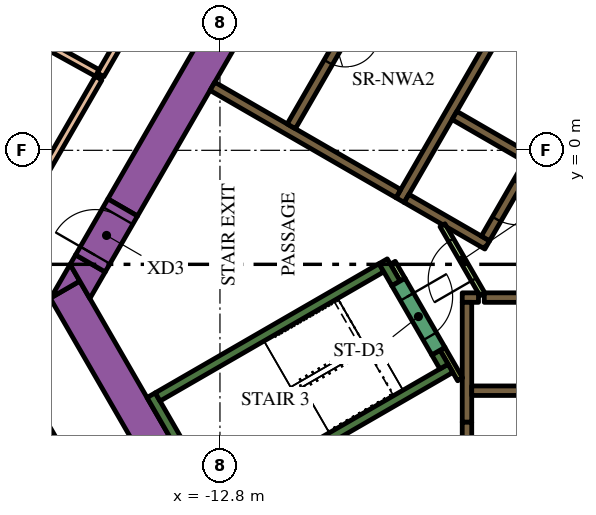
"""IFC4 building model, lengths in metres.
Left out: names, types, materials, properties, quantities, classifications, styles, units other than length and angle.
Written with IfcOpenShell. Run it as: python <this file> out.ifc"""

import sys

from ifc_helpers import new_model, si_unit, direction, frame, frame_2d, origin, place, context, subcontext, project, spatial, polyline, rectangle, outline, extrude, element, fill, save


model = new_model("IFC4")
c1 = context("Model", 3, precision=1e-05, world=origin(), true_north=direction((0.0, 1.0)))
c2 = subcontext(c1, "Body", "Model", "MODEL_VIEW")
j1 = project(units=[si_unit("LENGTHUNIT", "METRE"), si_unit("PLANEANGLEUNIT", "RADIAN")], contexts=[c1])
p1 = place(None, origin())
s1 = spatial("IfcSite", under=j1, at=p1, CompositionType="ELEMENT")
p2 = place(p1, origin())
s2 = spatial("IfcBuilding", under=s1, at=p2, CompositionType="ELEMENT")
p3 = place(p2, frame((0.0, 0.0, 78.3)))
s3 = spatial("IfcBuildingStorey", under=s2, at=p3, CompositionType="ELEMENT", Elevation=78.3)
p4 = place(p3, frame((-15.36, -1.503, 0.0), z_axis=(0.0, 0.0, 1.0), x_axis=(0.50000389221, 0.866023156604, 0.0)))
e1 = element("IfcWall", 1, at=p4, inside=s3, PredefinedType="SOLIDWALL", context=c2, shape_type="SweptSolid", body=[
    extrude(rectangle(XDim=21.0, YDim=0.9, at=frame_2d((10.5, 0.0))), origin(), (0.0, 0.0, 1.0), 5.4),
])
p5 = place(p3, frame((-12.134, -11.883, 0.0), z_axis=(0.0, 0.0, 1.0), x_axis=(-0.500005339912, 0.866022320763, 0.0)))
e2 = element("IfcWall", 2, at=p5, inside=s3, PredefinedType="SOLIDWALL", context=c2, shape_type="SweptSolid", body=[
    extrude(rectangle(XDim=9.488, YDim=0.9, at=frame_2d((4.744, 0.0))), origin(), (0.0, 0.0, 1.0), 5.4),
])
p6 = place(p3, origin())
e3 = element("IfcWall", 3, at=p6, inside=s3, PredefinedType="SOLIDWALL", context=c2, shape_type="SweptSolid", body=[
    extrude(outline(polyline([(-16.489, -3.44), (-17.251, -3.88), (-16.743, -3.0), (-16.489, -3.44)])), origin(), (0.0, 0.0, 1.0), 5.4),
])
e4 = element("IfcWall", 4, at=p6, inside=s3, PredefinedType="SOLIDWALL", context=c2, shape_type="SweptSolid", body=[
    extrude(outline(polyline([(-15.82, -3.201), (-16.223, -3.9), (-16.743, -3.0), (-16.599, -2.751), (-15.82, -3.201)])), origin(), (0.0, 0.0, 1.0), 5.4),
])
p7 = place(p3, frame((-12.885, -9.431, 0.0), z_axis=(0.0, 0.0, 1.0), x_axis=(-0.500020560727, 0.866013532718, 0.0)))
e5 = element("IfcWall", 5, at=p7, inside=s3, PredefinedType="SOLIDWALL", context=c2, shape_type="SweptSolid", body=[
    extrude(rectangle(XDim=3.45, YDim=0.25, at=frame_2d((1.725, 0.0))), origin(), (0.0, 0.0, 1.0), 5.4),
])
p8 = place(p3, frame((-14.44, -6.49, 0.0), z_axis=(0.0, 0.0, 1.0), x_axis=(0.866022966069, 0.500004222222, 0.0)))
e6 = element("IfcWall", 6, at=p8, inside=s3, PredefinedType="SOLIDWALL", context=c2, shape_type="SweptSolid", body=[
    extrude(rectangle(XDim=6.8, YDim=0.25, at=frame_2d((3.4, 0.0))), origin(), (0.0, 0.0, 1.0), 5.4),
])
p9 = place(p3, frame((-8.168, -3.503, 0.0), z_axis=(0.0, 0.0, 1.0), x_axis=(-0.499952099219, 0.866053057547, 0.0)))
e7 = element("IfcWall", 7, at=p9, inside=s3, PredefinedType="SOLIDWALL", context=c2, shape_type="SweptSolid", body=[
    extrude(rectangle(XDim=0.675, YDim=0.25, at=frame_2d((0.337, 0.0))), origin(), (0.0, 0.0, 1.0), 5.4),
])
p10 = place(p3, frame((-12.84, -9.261, 0.0), z_axis=(0.0, 0.0, 1.0), x_axis=(0.866016039709, 0.500016218704, 0.0)))
e8 = element("IfcWall", 8, at=p10, inside=s3, PredefinedType="SOLIDWALL", context=c2, shape_type="SweptSolid", body=[
    extrude(rectangle(XDim=7.05, YDim=0.25, at=frame_2d((3.525, 0.0))), origin(), (0.0, 0.0, 1.0), 5.4),
])
p11 = place(p3, frame((-6.905, -5.69, 0.0), z_axis=(0.0, 0.0, 1.0), x_axis=(-0.500402024738, 0.865793170242, 0.0)))
e9 = element("IfcWall", 9, at=p11, inside=s3, PredefinedType="SOLIDWALL", context=c2, shape_type="SweptSolid", body=[
    extrude(rectangle(XDim=0.425, YDim=0.25, at=frame_2d((0.212, 0.0))), origin(), (0.0, 0.0, 1.0), 5.4),
])
p12 = place(p3, frame((-5.845, -3.875, 0.0), z_axis=(0.0, 0.0, 1.0), x_axis=(1.0, 0.0, 0.0)))
e10 = element("IfcWall", 10, at=p12, inside=s3, PredefinedType="SOLIDWALL", context=c2, shape_type="SweptSolid", body=[
    extrude(rectangle(XDim=12.27, YDim=0.25, at=frame_2d((6.135, 0.0))), origin(), (0.0, 0.0, 1.0), 5.4),
])
p13 = place(p3, frame((-6.425, -3.875, 0.0), z_axis=(0.0, 0.0, 1.0), x_axis=(1.0, 0.0, 0.0)))
e11 = element("IfcWall", 11, at=p13, inside=s3, PredefinedType="SOLIDWALL", context=c2, shape_type="SweptSolid", body=[
    extrude(rectangle(XDim=0.428, YDim=0.25, at=frame_2d((0.214, 0.0))), origin(), (0.0, 0.0, 1.0), 5.4),
])
p14 = place(p3, frame((-6.3, -4.0, 0.0), z_axis=(0.0, 0.0, 1.0), x_axis=(0.0, -1.0, 0.0)))
e12 = element("IfcWall", 12, at=p14, inside=s3, PredefinedType="SOLIDWALL", context=c2, shape_type="SweptSolid", body=[
    extrude(rectangle(XDim=3.154, YDim=0.25, at=frame_2d((1.577, 0.0))), origin(), (0.0, 0.0, 1.0), 5.4),
])
p15 = place(p3, frame((-8.06, -1.311, 0.0), z_axis=(0.0, 0.0, 1.0), x_axis=(0.50000273126, 0.866023826885, 0.0)))
e13 = element("IfcWall", 13, at=p15, inside=s3, PredefinedType="SOLIDWALL", context=c2, shape_type="SweptSolid", body=[
    extrude(rectangle(XDim=10.33, YDim=0.25, at=frame_2d((5.165, 0.0))), origin(), (0.0, 0.0, 1.0), 5.4),
])
for number, where, z_axis, x_axis in (
    (14, (-5.369, 3.1, 0.0), (0.0, 0.0, 1.0), (0.866, -0.5, 0.0)),
    (15, (-4.724, -0.182, 0.0), (0.0, 0.0, 1.0), (-0.866, 0.5, 0.0)),
):
    element("IfcWall", number, at=place(p3, frame(where, z_axis=z_axis, x_axis=x_axis)), inside=s3, PredefinedType="SOLIDWALL", context=c2, shape_type="SweptSolid", body=[
        extrude(rectangle(XDim=2.2, YDim=0.25, at=frame_2d((1.1, 0.0))), origin(), (0.0, 0.0, 1.0), 5.4),
    ])
e16 = element("IfcWall", 16, at=p6, inside=s3, PredefinedType="SOLIDWALL", context=c2, shape_type="SweptSolid", body=[
    extrude(outline(polyline([(-5.922, -2.257), (-5.922, -2.257), (-5.705, -2.382), (-5.83, -2.598), (-6.829, -2.021), (-6.88, -1.934), (-6.88, -1.934), (-6.93, -1.963), (-7.952, -1.373), (-7.827, -1.156), (-5.922, -2.257)])), origin(), (0.0, 0.0, 1.0), 5.4),
])
p16 = place(p3, frame((-8.106, -1.14, 0.0), z_axis=(0.0, 0.0, 1.0), x_axis=(-0.866000643155, 0.500042884217, 0.0)))
e17 = element("IfcWall", 17, at=p16, inside=s3, PredefinedType="SOLIDWALL", context=c2, shape_type="SweptSolid", body=[
    extrude(rectangle(XDim=5.65, YDim=0.25, at=frame_2d((2.825, 0.0))), origin(), (0.0, 0.0, 1.0), 5.4),
])
p17 = place(p3, frame((-6.48, -6.027, 0.0), z_axis=(0.0, 0.0, 1.0), x_axis=(-0.499927229454, 0.866067413802, 0.0)))
e18 = element("IfcWall", 18, at=p17, inside=s3, PredefinedType="PARTITIONING", context=c2, shape_type="SweptSolid", body=[
    extrude(rectangle(XDim=0.929, YDim=0.15, at=frame_2d((0.464, 0.0))), origin(), (0.0, 0.0, 1.0), 5.4),
])
p18 = place(p3, frame((-8.252, -2.958, 0.0), z_axis=(0.0, 0.0, 1.0), x_axis=(0.500174715838, -0.865924508047, 0.0)))
e19 = element("IfcWall", 19, at=p18, inside=s3, PredefinedType="PARTITIONING", context=c2, shape_type="SweptSolid", body=[
    extrude(rectangle(XDim=0.514, YDim=0.15, at=frame_2d((0.257, 0.0))), origin(), (0.0, 0.0, 1.0), 4.25),
])
p19 = place(p3, frame((-6.175, -6.325, 0.0), z_axis=(0.0, 0.0, 1.0), x_axis=(1.0, 0.0, 0.0)))
e20 = element("IfcWall", 20, at=p19, inside=s3, PredefinedType="SOLIDWALL", context=c2, shape_type="SweptSolid", body=[
    extrude(rectangle(XDim=12.35, YDim=0.25, at=frame_2d((6.175, 0.0))), origin(), (0.0, 0.0, 1.0), 5.4),
])
p20 = place(p19, frame((3.205, 0.0, 0.0)))
e21 = element("IfcOpeningElement", 21, at=p20, cuts=e20, PredefinedType="OPENING", context=c2, shape_type="SweptSolid", body=[
    extrude(rectangle(XDim=0.9, YDim=2.1, at=frame_2d((0.45, 1.05))), frame((0.0, 0.135, 0.0), z_axis=(0.0, -1.0, 0.0), x_axis=(1.0, 0.0, 0.0)), (0.0, 0.0, 1.0), 0.27),
])
p21 = place(p19, frame((8.145, 0.0, 0.0)))
e22 = element("IfcOpeningElement", 22, at=p21, cuts=e20, PredefinedType="OPENING", context=c2, shape_type="SweptSolid", body=[
    extrude(rectangle(XDim=1.1, YDim=2.1, at=frame_2d((0.55, 1.05))), frame((0.0, 0.135, 0.0), z_axis=(0.0, -1.0, 0.0), x_axis=(1.0, 0.0, 0.0)), (0.0, 0.0, 1.0), 0.27),
])
p22 = place(p19, frame((10.665, 0.0, 0.0)))
e23 = element("IfcOpeningElement", 23, at=p22, cuts=e20, PredefinedType="OPENING", context=c2, shape_type="SweptSolid", body=[
    extrude(rectangle(XDim=1.1, YDim=2.1, at=frame_2d((0.55, 1.05))), frame((0.0, 0.135, 0.0), z_axis=(0.0, -1.0, 0.0), x_axis=(1.0, 0.0, 0.0)), (0.0, 0.0, 1.0), 0.27),
])
p23 = place(p3, frame((-6.008, 9.144, 0.0), z_axis=(0.0, 0.0, 1.0), x_axis=(-0.500006956611, -0.866021387346, 0.0)))
e24 = element("IfcWall", 24, at=p23, inside=s3, PredefinedType="SOLIDWALL", context=c2, shape_type="SweptSolid", body=[
    extrude(rectangle(XDim=9.83, YDim=0.25, at=frame_2d((4.915, 0.0))), origin(), (0.0, 0.0, 1.0), 5.4),
])
p24 = place(p23, frame((6.985, 0.0, 0.0)))
e25 = element("IfcOpeningElement", 25, at=p24, cuts=e24, PredefinedType="OPENING", context=c2, shape_type="SweptSolid", body=[
    extrude(rectangle(XDim=0.9, YDim=2.1, at=frame_2d((0.45, 1.05))), frame((0.0, 0.135, 0.0), z_axis=(0.0, -1.0, 0.0), x_axis=(1.0, 0.0, 0.0)), (0.0, 0.0, 1.0), 0.27),
])
p25 = place(p3, frame((-0.898, 6.194, 0.0), z_axis=(0.0, 0.0, 1.0), x_axis=(-0.499996202215, -0.866027596426, 0.0)))
e26 = element("IfcWall", 26, at=p25, inside=s3, PredefinedType="SOLIDWALL", context=c2, shape_type="SweptSolid", body=[
    extrude(rectangle(XDim=9.83, YDim=0.25, at=frame_2d((4.915, 0.0))), origin(), (0.0, 0.0, 1.0), 5.4),
])
p26 = place(p25, frame((0.585, 0.0, 0.0)))
e27 = element("IfcOpeningElement", 27, at=p26, cuts=e26, PredefinedType="OPENING", context=c2, shape_type="SweptSolid", body=[
    extrude(rectangle(XDim=1.1, YDim=2.1, at=frame_2d((0.55, 1.05))), frame((0.0, 0.135, 0.0), z_axis=(0.0, -1.0, 0.0), x_axis=(1.0, 0.0, 0.0)), (0.0, 0.0, 1.0), 0.27),
])
p27 = place(p25, frame((3.105, 0.0, 0.0)))
e28 = element("IfcOpeningElement", 28, at=p27, cuts=e26, PredefinedType="OPENING", context=c2, shape_type="SweptSolid", body=[
    extrude(rectangle(XDim=1.1, YDim=2.1, at=frame_2d((0.55, 1.05))), frame((0.0, 0.135, 0.0), z_axis=(0.0, -1.0, 0.0), x_axis=(1.0, 0.0, 0.0)), (0.0, 0.0, 1.0), 0.27),
])
p28 = place(p25, frame((5.625, 0.0, 0.0)))
e29 = element("IfcOpeningElement", 29, at=p28, cuts=e26, PredefinedType="OPENING", context=c2, shape_type="SweptSolid", body=[
    extrude(rectangle(XDim=1.1, YDim=2.1, at=frame_2d((0.55, 1.05))), frame((0.0, 0.135, 0.0), z_axis=(0.0, -1.0, 0.0), x_axis=(1.0, 0.0, 0.0)), (0.0, 0.0, 1.0), 0.27),
])
p29 = place(p25, frame((8.145, 0.0, 0.0)))
e30 = element("IfcOpeningElement", 30, at=p29, cuts=e26, PredefinedType="OPENING", context=c2, shape_type="SweptSolid", body=[
    extrude(rectangle(XDim=1.1, YDim=2.1, at=frame_2d((0.55, 1.05))), frame((0.0, 0.135, 0.0), z_axis=(0.0, -1.0, 0.0), x_axis=(1.0, 0.0, 0.0)), (0.0, 0.0, 1.0), 0.27),
])
p30 = place(p3, frame((-8.103, -3.466, 0.0), z_axis=(0.0, 0.0, 1.0), x_axis=(0.500078061341, -0.865980330357, 0.0)))
e31 = element("IfcWall", 31, at=p30, inside=s3, PredefinedType="SOLIDWALL", context=c2, shape_type="SweptSolid", body=[
    extrude(rectangle(XDim=2.1, YDim=0.4, at=frame_2d((1.05, 0.0))), origin(), (0.0, 0.0, 1.0), 5.4),
])
p31 = place(p30, frame((0.45, 0.0, 0.0)))
e32 = element("IfcOpeningElement", 32, at=p31, cuts=e31, PredefinedType="OPENING", context=c2, shape_type="SweptSolid", body=[
    extrude(rectangle(XDim=1.2, YDim=2.1, at=frame_2d((0.6, 1.05))), frame((0.0, 0.21, 0.0), z_axis=(0.0, -1.0, 0.0), x_axis=(1.0, 0.0, 0.0)), (0.0, 0.0, 1.0), 0.42),
])
p32 = place(p3, frame((-6.3, -7.154, 0.0), z_axis=(0.0, 0.0, 1.0), x_axis=(0.0, -1.0, 0.0)))
e33 = element("IfcWall", 33, at=p32, inside=s3, PredefinedType="SOLIDWALL", context=c2, shape_type="SweptSolid", body=[
    extrude(rectangle(XDim=1.8, YDim=0.25, at=frame_2d((0.9, 0.0))), origin(), (0.0, 0.0, 1.0), 5.4),
])
p33 = place(p32, frame((0.45, 0.0, 0.0)))
e34 = element("IfcOpeningElement", 34, at=p33, cuts=e33, PredefinedType="OPENING", context=c2, shape_type="SweptSolid", body=[
    extrude(rectangle(XDim=0.9, YDim=2.1, at=frame_2d((0.45, 1.05))), frame((0.0, 0.135, 0.0), z_axis=(0.0, -1.0, 0.0), x_axis=(1.0, 0.0, 0.0)), (0.0, 0.0, 1.0), 0.27),
])
p34 = place(p3, frame((-5.895, -3.79, 0.0), z_axis=(0.0, 0.0, 1.0), x_axis=(-0.49994051562, 0.866059744384, 0.0)))
e35 = element("IfcWall", 35, at=p34, inside=s3, PredefinedType="PARTITIONING", context=c2, shape_type="SweptSolid", body=[
    extrude(rectangle(XDim=2.1, YDim=0.15, at=frame_2d((1.05, 0.0))), origin(), (0.0, 0.0, 1.0), 4.25),
])
p35 = place(p34, frame((0.45, 0.0, 0.0)))
e36 = element("IfcOpeningElement", 36, at=p35, cuts=e35, PredefinedType="OPENING", context=c2, shape_type="SweptSolid", body=[
    extrude(rectangle(XDim=1.2, YDim=2.1, at=frame_2d((0.6, 1.05))), frame((0.0, 0.085, 0.0), z_axis=(0.0, -1.0, 0.0), x_axis=(1.0, 0.0, 0.0)), (0.0, 0.0, 1.0), 0.17),
])
p36 = place(p3, frame((-16.209, -2.976, 0.0), z_axis=(0.0, 0.0, 1.0), x_axis=(0.499954529098, 0.86605165483, 0.0)))
e37 = element("IfcWall", 37, at=p36, inside=s3, PredefinedType="SOLIDWALL", context=c2, shape_type="SweptSolid", body=[
    extrude(rectangle(XDim=1.7, YDim=0.9, at=frame_2d((0.85, 0.0))), origin(), (0.0, 0.0, 1.0), 5.4),
])
p37 = place(p36, frame((0.25, 0.0, 0.0)))
e38 = element("IfcOpeningElement", 38, at=p37, cuts=e37, PredefinedType="OPENING", context=c2, shape_type="SweptSolid", body=[
    extrude(rectangle(XDim=1.2, YDim=2.1, at=frame_2d((0.6, 1.05))), frame((0.0, 0.46, 0.0), z_axis=(0.0, -1.0, 0.0), x_axis=(1.0, 0.0, 0.0)), (0.0, 0.0, 1.0), 0.92),
])
p38 = place(p3, frame((-9.692, 12.813, 0.0), z_axis=(0.0, 0.0, 1.0), x_axis=(-0.499991245628, -0.866030458065, 0.0)))
e39 = element("IfcWall", 39, at=p38, inside=s3, PredefinedType="PARTITIONING", context=c2, shape_type="SweptSolid", body=[
    extrude(rectangle(XDim=12.501, YDim=0.2, at=frame_2d((6.25, 0.0))), origin(), (0.0, 0.0, 1.0), 4.25),
])
p39 = place(p38, frame((5.651, 0.0, 0.0)))
e40 = element("IfcOpeningElement", 40, at=p39, cuts=e39, PredefinedType="OPENING", context=c2, shape_type="SweptSolid", body=[
    extrude(rectangle(XDim=1.2, YDim=2.1, at=frame_2d((0.6, 1.05))), frame((0.0, 0.11, 0.0), z_axis=(0.0, -1.0, 0.0), x_axis=(1.0, 0.0, 0.0)), (0.0, 0.0, 1.0), 0.22),
])
p40 = place(p3, frame((-21.942, 5.304, 0.0), z_axis=(0.0, 0.0, 1.0), x_axis=(0.875134013618, -0.483880623924, 0.0)))
e41 = element("IfcWall", 41, at=p40, inside=s3, PredefinedType="PARTITIONING", context=c2, shape_type="SweptSolid", body=[
    extrude(rectangle(XDim=6.755, YDim=0.2, at=frame_2d((3.378, 0.0))), origin(), (0.0, 0.0, 1.0), 4.25),
])
p41 = place(p3, frame((-19.341, -3.9, 0.0), z_axis=(0.0, 0.0, 1.0), x_axis=(0.500035875758, 0.866004689915, 0.0)))
e42 = element("IfcWall", 42, at=p41, inside=s3, PredefinedType="PARTITIONING", context=c2, shape_type="SweptSolid", body=[
    extrude(rectangle(XDim=6.698, YDim=0.2, at=frame_2d((3.349, 0.0))), origin(), (0.0, 0.0, 1.0), 4.25),
])
p42 = place(p3, frame((-16.62, -8.614, 0.0), z_axis=(0.0, 0.0, 1.0), x_axis=(-0.499969845129, 0.866042813007, 0.0)))
e43 = element("IfcWall", 43, at=p42, inside=s3, PredefinedType="PARTITIONING", context=c2, shape_type="SweptSolid", body=[
    extrude(rectangle(XDim=5.353, YDim=0.2, at=frame_2d((2.677, 0.0))), origin(), (0.0, 0.0, 1.0), 4.25),
])
p43 = place(p24, origin())
e44 = element("IfcDoor", 44, at=p43, inside=s3, OperationType="SINGLE_SWING_LEFT", PredefinedType="DOOR", context=c2, shape_type="SweptSolid", body=[
    extrude(rectangle(XDim=0.9, YDim=2.1, at=frame_2d((0.45, 1.05))), frame((0.0, 0.025, 0.0), z_axis=(0.0, -1.0, 0.0), x_axis=(1.0, 0.0, 0.0)), (0.0, 0.0, 1.0), 0.05),
])
fill(e25, e44)
p44 = place(p29, origin())
e45 = element("IfcDoor", 45, at=p44, inside=s3, OperationType="DOUBLE_DOOR_SLIDING", PredefinedType="DOOR", context=c2, shape_type="SweptSolid", body=[
    extrude(rectangle(XDim=1.1, YDim=2.1, at=frame_2d((0.55, 1.05))), frame((0.0, 0.025, 0.0), z_axis=(0.0, -1.0, 0.0), x_axis=(1.0, 0.0, 0.0)), (0.0, 0.0, 1.0), 0.05),
])
fill(e30, e45)
p45 = place(p31, origin())
e46 = element("IfcDoor", 46, at=p45, inside=s3, OperationType="SINGLE_SWING_LEFT", PredefinedType="DOOR", context=c2, shape_type="SweptSolid", body=[
    extrude(rectangle(XDim=1.2, YDim=2.1, at=frame_2d((0.6, 1.05))), frame((0.0, 0.025, 0.0), z_axis=(0.0, -1.0, 0.0), x_axis=(1.0, 0.0, 0.0)), (0.0, 0.0, 1.0), 0.05),
])
fill(e32, e46)
p46 = place(p35, origin())
e47 = element("IfcDoor", 47, at=p46, inside=s3, OperationType="SINGLE_SWING_LEFT", PredefinedType="DOOR", context=c2, shape_type="SweptSolid", body=[
    extrude(rectangle(XDim=1.2, YDim=2.1, at=frame_2d((0.6, 1.05))), frame((0.0, 0.025, 0.0), z_axis=(0.0, -1.0, 0.0), x_axis=(1.0, 0.0, 0.0)), (0.0, 0.0, 1.0), 0.05),
])
fill(e36, e47)
p47 = place(p37, origin())
e48 = element("IfcDoor", 48, at=p47, inside=s3, OperationType="SINGLE_SWING_LEFT", PredefinedType="DOOR", context=c2, shape_type="SweptSolid", body=[
    extrude(rectangle(XDim=1.2, YDim=2.1, at=frame_2d((0.6, 1.05))), frame((0.0, 0.025, 0.0), z_axis=(0.0, -1.0, 0.0), x_axis=(1.0, 0.0, 0.0)), (0.0, 0.0, 1.0), 0.05),
])
fill(e38, e48)
save(model, sys.argv[1])
